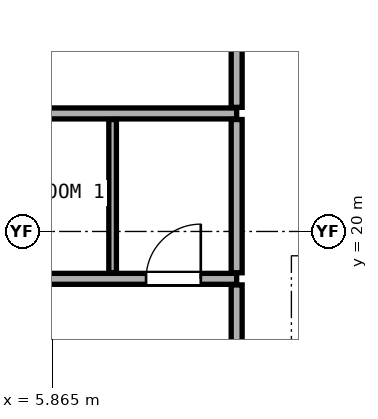
"""IFC4 building model, lengths in metres.
Left out: names, types, materials, properties, quantities, classifications, styles, units other than length and angle.
Written with IfcOpenShell. Run it as: python <this file> out.ifc"""

import sys

from ifc_helpers import new_model, si_unit, direction, frame, frame_2d, origin, place, context, subcontext, project, spatial, rectangle, extrude, element, fill, save


model = new_model("IFC4")
c1 = context("Model", 3, precision=1e-05, world=origin(), true_north=direction((0.0, 1.0)))
c2 = subcontext(c1, "Body", "Model", "MODEL_VIEW")
j1 = project(units=[si_unit("LENGTHUNIT", "METRE"), si_unit("PLANEANGLEUNIT", "RADIAN")], contexts=[c1])
p1 = place(None, origin())
s1 = spatial("IfcSite", under=j1, at=p1, CompositionType="ELEMENT")
p2 = place(p1, origin())
s2 = spatial("IfcBuilding", under=s1, at=p2, CompositionType="ELEMENT")
p3 = place(p2, frame((0.0, 0.0, 101.6)))
s3 = spatial("IfcBuildingStorey", under=s2, at=p3, CompositionType="ELEMENT", Elevation=101.6)
p4 = place(p3, frame((-0.85, 19.221, 0.0), z_axis=(0.0, 0.0, 1.0), x_axis=(1.0, 0.0, 0.0)))
e1 = element("IfcWall", 1, at=p4, inside=s3, PredefinedType="PARTITIONING", context=c2, shape_type="SweptSolid", body=[
    extrude(rectangle(XDim=9.75, YDim=0.18, at=frame_2d((4.875, 0.0))), origin(), (0.0, 0.0, 1.0), 2.145),
])
p5 = place(p4, frame((3.75, 0.0, 0.0)))
e2 = element("IfcOpeningElement", 2, at=p5, cuts=e1, PredefinedType="OPENING", context=c2, shape_type="SweptSolid", body=[
    extrude(rectangle(XDim=0.85, YDim=2.01, at=frame_2d((0.425, 1.005))), frame((0.0, 0.1, 0.0), z_axis=(0.0, -1.0, 0.0), x_axis=(1.0, 0.0, 0.0)), (0.0, 0.0, 1.0), 0.2),
])
p6 = place(p4, frame((8.26, 0.0, 0.0)))
e3 = element("IfcOpeningElement", 3, at=p6, cuts=e1, PredefinedType="OPENING", context=c2, shape_type="SweptSolid", body=[
    extrude(rectangle(XDim=0.9, YDim=2.1, at=frame_2d((0.45, 1.05))), frame((0.0, 0.1, 0.0), z_axis=(0.0, -1.0, 0.0), x_axis=(1.0, 0.0, 0.0)), (0.0, 0.0, 1.0), 0.2),
])
p7 = place(p3, frame((-0.85, 21.941, 0.0), z_axis=(0.0, 0.0, 1.0), x_axis=(1.0, 0.0, 0.0)))
e4 = element("IfcWall", 4, at=p7, inside=s3, PredefinedType="PARTITIONING", context=c2, shape_type="SweptSolid", body=[
    extrude(rectangle(XDim=9.75, YDim=0.18, at=frame_2d((4.875, 0.0))), origin(), (0.0, 0.0, 1.0), 2.145),
])
p8 = place(p3, frame((6.86, 19.321, 0.0), z_axis=(0.0, 0.0, 1.0), x_axis=(0.0, 1.0, 0.0)))
e5 = element("IfcWall", 5, at=p8, inside=s3, PredefinedType="PARTITIONING", context=c2, shape_type="SweptSolid", body=[
    extrude(rectangle(XDim=2.52, YDim=0.125, at=frame_2d((1.26, 0.0))), origin(), (0.0, 0.0, 1.0), 3.08),
])
p9 = place(p3, frame((8.9, 14.483, 0.0), z_axis=(0.0, 0.0, 1.0), x_axis=(0.0, 1.0, 0.0)))
e6 = element("IfcWall", 6, at=p9, inside=s3, PredefinedType="PARTITIONING", context=c2, shape_type="SweptSolid", body=[
    extrude(rectangle(XDim=4.638, YDim=0.18, at=frame_2d((2.319, 0.0))), origin(), (0.0, 0.0, 1.0), 2.456),
])
p10 = place(p9, frame((2.394, 0.0, 0.0)))
e7 = element("IfcOpeningElement", 7, at=p10, cuts=e6, PredefinedType="OPENING", context=c2, shape_type="SweptSolid", body=[
    extrude(rectangle(XDim=1.05, YDim=2.2, at=frame_2d((0.525, 1.1))), frame((0.0, 0.1, 0.0), z_axis=(0.0, -1.0, 0.0), x_axis=(1.0, 0.0, 0.0)), (0.0, 0.0, 1.0), 0.2),
])
p11 = place(p3, frame((8.9, 19.321, 0.0), z_axis=(0.0, 0.0, 1.0), x_axis=(0.0, 1.0, 0.0)))
e8 = element("IfcWall", 8, at=p11, inside=s3, PredefinedType="PARTITIONING", context=c2, shape_type="SweptSolid", body=[
    extrude(rectangle(XDim=2.52, YDim=0.18, at=frame_2d((1.26, 0.0))), origin(), (0.0, 0.0, 1.0), 3.08),
])
p12 = place(p3, frame((8.9, 22.041, 0.0), z_axis=(0.0, 0.0, 1.0), x_axis=(0.0, 1.0, 0.0)))
e9 = element("IfcWall", 9, at=p12, inside=s3, PredefinedType="PARTITIONING", context=c2, shape_type="SweptSolid", body=[
    extrude(rectangle(XDim=3.107, YDim=0.18, at=frame_2d((1.553, 0.0))), origin(), (0.0, 0.0, 1.0), 2.299),
])
p13 = place(p12, frame((1.029, 0.0, 0.0)))
e10 = element("IfcOpeningElement", 10, at=p13, cuts=e9, PredefinedType="OPENING", context=c2, shape_type="SweptSolid", body=[
    extrude(rectangle(XDim=1.05, YDim=2.2, at=frame_2d((0.525, 1.1))), frame((0.0, 0.1, 0.0), z_axis=(0.0, -1.0, 0.0), x_axis=(1.0, 0.0, 0.0)), (0.0, 0.0, 1.0), 0.2),
])
p14 = place(p6, origin())
e11 = element("IfcDoor", 11, at=p14, inside=s3, OperationType="SINGLE_SWING_RIGHT", PredefinedType="DOOR", context=c2, shape_type="SweptSolid", body=[
    extrude(rectangle(XDim=0.9, YDim=2.1, at=frame_2d((0.45, 1.05))), frame((0.0, 0.025, 0.0), z_axis=(0.0, -1.0, 0.0), x_axis=(1.0, 0.0, 0.0)), (0.0, 0.0, 1.0), 0.05),
])
fill(e3, e11)
save(model, sys.argv[1])
